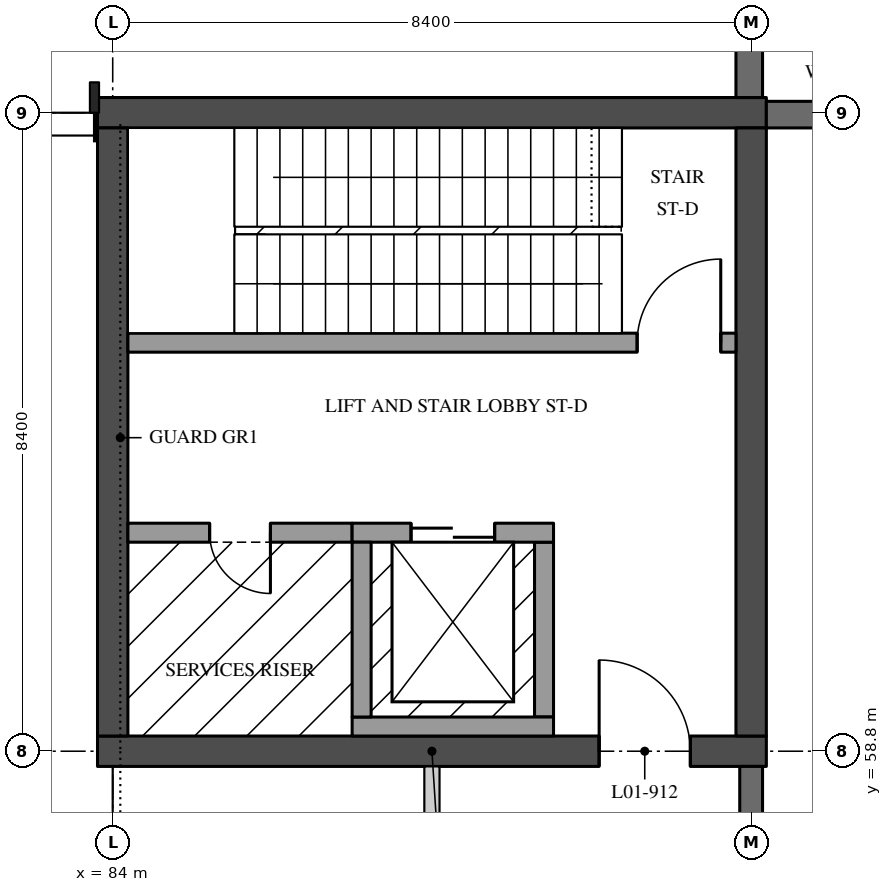
"""IFC4 building model, lengths in metres.
Left out: names, types, materials, properties, quantities, classifications, styles, units other than length and angle.
Written with IfcOpenShell. Run it as: python <this file> out.ifc"""

import sys

from ifc_helpers import new_model, si_unit, direction, frame, frame_2d, origin, place, context, subcontext, project, spatial, rectangle, extrude, element, fill, save


model = new_model("IFC4")
c1 = context("Model", 3, precision=1e-05, world=origin(), true_north=direction((0.0, 1.0)))
c2 = subcontext(c1, "Body", "Model", "MODEL_VIEW")
j1 = project(units=[si_unit("LENGTHUNIT", "METRE"), si_unit("PLANEANGLEUNIT", "RADIAN")], contexts=[c1])
p1 = place(None, origin())
s1 = spatial("IfcSite", under=j1, at=p1, CompositionType="ELEMENT")
p2 = place(p1, origin())
s2 = spatial("IfcBuilding", under=s1, at=p2, CompositionType="ELEMENT")
p3 = place(p2, frame((0.0, 0.0, 5.4)))
s3 = spatial("IfcBuildingStorey", under=s2, at=p3, CompositionType="ELEMENT", Elevation=5.4)
p4 = place(p3, frame((83.8, 58.8, 0.0), z_axis=(0.0, 0.0, 1.0), x_axis=(1.0, 0.0, 0.0)))
e1 = element("IfcWall", 1, at=p4, inside=s3, PredefinedType="SHEAR", context=c2, shape_type="SweptSolid", body=[
    extrude(rectangle(XDim=8.8, YDim=0.4, at=frame_2d((4.4, 0.0))), origin(), (0.0, 0.0, 1.0), 4.25),
])
p5 = place(p4, frame((6.6, 0.0, 0.0)))
e2 = element("IfcOpeningElement", 2, at=p5, cuts=e1, PredefinedType="OPENING", context=c2, shape_type="SweptSolid", body=[
    extrude(rectangle(XDim=1.2, YDim=2.1, at=frame_2d((0.6, 1.05))), frame((0.0, 0.21, 0.0), z_axis=(0.0, -1.0, 0.0), x_axis=(1.0, 0.0, 0.0)), (0.0, 0.0, 1.0), 0.42),
])
p6 = place(p3, frame((83.8, 67.2, 0.0), z_axis=(0.0, 0.0, 1.0), x_axis=(1.0, 0.0, 0.0)))
e3 = element("IfcWall", 3, at=p6, inside=s3, PredefinedType="SHEAR", context=c2, shape_type="SweptSolid", body=[
    extrude(rectangle(XDim=8.8, YDim=0.4, at=frame_2d((4.4, 0.0))), origin(), (0.0, 0.0, 1.0), 4.25),
])
for number, where, z_axis, x_axis in (
    (4, (84.0, 59.0, 0.0), (0.0, 0.0, 1.0), (0.0, 1.0, 0.0)),
    (5, (92.4, 59.0, 0.0), (0.0, 0.0, 1.0), (0.0, 1.0, 0.0)),
):
    element("IfcWall", number, at=place(p3, frame(where, z_axis=z_axis, x_axis=x_axis)), inside=s3, PredefinedType="SHEAR", context=c2, shape_type="SweptSolid", body=[
        extrude(rectangle(XDim=8.0, YDim=0.4, at=frame_2d((4.0, 0.0))), origin(), (0.0, 0.0, 1.0), 4.25),
    ])
p7 = place(p3, frame((92.2, 64.175, 0.0), z_axis=(0.0, 0.0, 1.0), x_axis=(-1.0, 0.0, 0.0)))
e6 = element("IfcWall", 6, at=p7, inside=s3, PredefinedType="SOLIDWALL", context=c2, shape_type="SweptSolid", body=[
    extrude(rectangle(XDim=8.0, YDim=0.25, at=frame_2d((4.0, 0.0))), origin(), (0.0, 0.0, 1.0), 4.25),
])
p8 = place(p7, frame((0.2, 0.0, 0.0)))
e7 = element("IfcOpeningElement", 7, at=p8, cuts=e6, PredefinedType="OPENING", context=c2, shape_type="SweptSolid", body=[
    extrude(rectangle(XDim=1.1, YDim=2.1, at=frame_2d((0.55, 1.05))), frame((0.0, 0.135, 0.0), z_axis=(0.0, -1.0, 0.0), x_axis=(1.0, 0.0, 0.0)), (0.0, 0.0, 1.0), 0.27),
])
p9 = place(p3, frame((87.15, 61.675, 0.0), z_axis=(0.0, 0.0, 1.0), x_axis=(-1.0, 0.0, 0.0)))
e8 = element("IfcWall", 8, at=p9, inside=s3, PredefinedType="SOLIDWALL", context=c2, shape_type="SweptSolid", body=[
    extrude(rectangle(XDim=2.95, YDim=0.25, at=frame_2d((1.475, 0.0))), origin(), (0.0, 0.0, 1.0), 4.25),
])
p10 = place(p9, frame((1.075, 0.0, 0.0)))
e9 = element("IfcOpeningElement", 9, at=p10, cuts=e8, PredefinedType="OPENING", context=c2, shape_type="SweptSolid", body=[
    extrude(rectangle(XDim=0.8, YDim=2.1, at=frame_2d((0.4, 1.05))), frame((0.0, 0.135, 0.0), z_axis=(0.0, -1.0, 0.0), x_axis=(1.0, 0.0, 0.0)), (0.0, 0.0, 1.0), 0.27),
])
p11 = place(p3, frame((89.675, 59.25, 0.0), z_axis=(0.0, 0.0, 1.0), x_axis=(0.0, 1.0, 0.0)))
e10 = element("IfcWall", 10, at=p11, inside=s3, PredefinedType="SOLIDWALL", context=c2, shape_type="SweptSolid", body=[
    extrude(rectangle(XDim=2.3, YDim=0.25, at=frame_2d((1.15, 0.0))), origin(), (0.0, 0.0, 1.0), 4.25),
])
p12 = place(p3, frame((87.15, 61.675, 0.0), z_axis=(0.0, 0.0, 1.0), x_axis=(1.0, 0.0, 0.0)))
e11 = element("IfcWall", 11, at=p12, inside=s3, PredefinedType="SOLIDWALL", context=c2, shape_type="SweptSolid", body=[
    extrude(rectangle(XDim=2.65, YDim=0.25, at=frame_2d((1.325, 0.0))), origin(), (0.0, 0.0, 1.0), 4.25),
])
p13 = place(p12, frame((0.775, 0.0, 0.0)))
e12 = element("IfcOpeningElement", 12, at=p13, cuts=e11, PredefinedType="OPENING", context=c2, shape_type="SweptSolid", body=[
    extrude(rectangle(XDim=1.1, YDim=2.1, at=frame_2d((0.55, 1.05))), frame((0.0, 0.135, 0.0), z_axis=(0.0, -1.0, 0.0), x_axis=(1.0, 0.0, 0.0)), (0.0, 0.0, 1.0), 0.27),
])
p14 = place(p3, frame((87.15, 59.125, 0.0), z_axis=(0.0, 0.0, 1.0), x_axis=(1.0, 0.0, 0.0)))
e13 = element("IfcWall", 13, at=p14, inside=s3, PredefinedType="SOLIDWALL", context=c2, shape_type="SweptSolid", body=[
    extrude(rectangle(XDim=2.65, YDim=0.25, at=frame_2d((1.325, 0.0))), origin(), (0.0, 0.0, 1.0), 4.25),
])
p15 = place(p3, frame((87.275, 59.25, 0.0), z_axis=(0.0, 0.0, 1.0), x_axis=(0.0, 1.0, 0.0)))
e14 = element("IfcWall", 14, at=p15, inside=s3, PredefinedType="SOLIDWALL", context=c2, shape_type="SweptSolid", body=[
    extrude(rectangle(XDim=2.3, YDim=0.25, at=frame_2d((1.15, 0.0))), origin(), (0.0, 0.0, 1.0), 4.25),
])
p16 = place(p2, origin())
s4 = spatial("IfcBuildingStorey", under=s2, at=p16, CompositionType="ELEMENT", Elevation=0.0)
p17 = place(p16, frame((84.0, 54.6, 0.0), z_axis=(0.0, 0.0, 1.0), x_axis=(0.0, 1.0, 0.0)))
e15 = element("IfcWall", 15, at=p17, inside=s4, PredefinedType="PARTITIONING", context=c2, shape_type="SweptSolid", body=[
    extrude(rectangle(XDim=4.0, YDim=0.2, at=frame_2d((2.0, 0.0))), origin(), (0.0, 0.0, 1.0), 18.77),
])
p18 = place(p17, frame((1.5, 0.0, 0.0)))
e16 = element("IfcOpeningElement", 16, at=p18, cuts=e15, PredefinedType="OPENING", context=c2, shape_type="SweptSolid", body=[
    extrude(rectangle(XDim=1.0, YDim=2.4, at=frame_2d((0.5, 1.2))), frame((0.0, 0.11, 0.0), z_axis=(0.0, -1.0, 0.0), x_axis=(1.0, 0.0, 0.0)), (0.0, 0.0, 1.0), 0.22),
])
p19 = place(p16, frame((79.9, 63.0, 0.0), z_axis=(0.0, 0.0, 1.0), x_axis=(1.0, 0.0, 0.0)))
e17 = element("IfcWall", 17, at=p19, inside=s4, PredefinedType="PARTITIONING", context=c2, shape_type="SweptSolid", body=[
    extrude(rectangle(XDim=3.9, YDim=0.2, at=frame_2d((1.95, 0.0))), origin(), (0.0, 0.0, 1.0), 18.77),
])
p20 = place(p19, frame((1.45, 0.0, 0.0)))
e18 = element("IfcOpeningElement", 18, at=p20, cuts=e17, PredefinedType="OPENING", context=c2, shape_type="SweptSolid", body=[
    extrude(rectangle(XDim=1.0, YDim=2.1, at=frame_2d((0.5, 1.05))), frame((0.0, 0.11, 0.0), z_axis=(0.0, -1.0, 0.0), x_axis=(1.0, 0.0, 0.0)), (0.0, 0.0, 1.0), 0.22),
])
p21 = place(p3, frame((88.2, 54.6, 0.0), z_axis=(0.0, 0.0, 1.0), x_axis=(0.0, 1.0, 0.0)))
e19 = element("IfcWall", 19, at=p21, inside=s3, PredefinedType="PARTITIONING", context=c2, shape_type="SweptSolid", body=[
    extrude(rectangle(XDim=4.0, YDim=0.2, at=frame_2d((2.0, 0.0))), origin(), (0.0, 0.0, 1.0), 4.25),
])
p22 = place(p21, frame((1.5, 0.0, 0.0)))
e20 = element("IfcOpeningElement", 20, at=p22, cuts=e19, PredefinedType="OPENING", context=c2, shape_type="SweptSolid", body=[
    extrude(rectangle(XDim=1.0, YDim=2.4, at=frame_2d((0.5, 1.2))), frame((0.0, 0.11, 0.0), z_axis=(0.0, -1.0, 0.0), x_axis=(1.0, 0.0, 0.0)), (0.0, 0.0, 1.0), 0.22),
])
p23 = place(p3, frame((92.375, 75.4, 0.0), z_axis=(0.0, 0.0, 1.0), x_axis=(0.0, -1.0, 0.0)))
e21 = element("IfcWall", 21, at=p23, inside=s3, PredefinedType="SOLIDWALL", context=c2, shape_type="SweptSolid", body=[
    extrude(rectangle(XDim=8.0, YDim=0.35, at=frame_2d((4.0, 0.0))), origin(), (0.0, 0.0, 1.0), 3.746),
])
p24 = place(p23, frame((2.8, 0.0, 1.5)))
e22 = element("IfcOpeningElement", 22, at=p24, cuts=e21, PredefinedType="OPENING", context=c2, shape_type="SweptSolid", body=[
    extrude(rectangle(XDim=0.3, YDim=1.5, at=frame_2d((0.15, 0.75))), frame((0.0, 0.185, 0.0), z_axis=(0.0, -1.0, 0.0), x_axis=(1.0, 0.0, 0.0)), (0.0, 0.0, 1.0), 0.37),
])
p25 = place(p23, frame((4.45, 0.0, 1.5)))
e23 = element("IfcOpeningElement", 23, at=p25, cuts=e21, PredefinedType="OPENING", context=c2, shape_type="SweptSolid", body=[
    extrude(rectangle(XDim=1.2, YDim=1.5, at=frame_2d((0.6, 0.75))), frame((0.0, 0.185, 0.0), z_axis=(0.0, -1.0, 0.0), x_axis=(1.0, 0.0, 0.0)), (0.0, 0.0, 1.0), 0.37),
])
p26 = place(p23, frame((7.0, 0.0, 1.5)))
e24 = element("IfcOpeningElement", 24, at=p26, cuts=e21, PredefinedType="OPENING", context=c2, shape_type="SweptSolid", body=[
    extrude(rectangle(XDim=0.3, YDim=1.5, at=frame_2d((0.15, 0.75))), frame((0.0, 0.185, 0.0), z_axis=(0.0, -1.0, 0.0), x_axis=(1.0, 0.0, 0.0)), (0.0, 0.0, 1.0), 0.37),
])
p27 = place(p3, frame((92.6, 67.175, 0.0), z_axis=(0.0, 0.0, 1.0), x_axis=(1.0, 0.0, 0.0)))
e25 = element("IfcWall", 25, at=p27, inside=s3, PredefinedType="SOLIDWALL", context=c2, shape_type="SweptSolid", body=[
    extrude(rectangle(XDim=7.77, YDim=0.35, at=frame_2d((3.885, 0.0))), origin(), (0.0, 0.0, 1.0), 3.746),
])
p28 = place(p27, frame((0.7, 0.0, 1.5)))
e26 = element("IfcOpeningElement", 26, at=p28, cuts=e25, PredefinedType="OPENING", context=c2, shape_type="SweptSolid", body=[
    extrude(rectangle(XDim=0.3, YDim=1.5, at=frame_2d((0.15, 0.75))), frame((0.0, 0.185, 0.0), z_axis=(0.0, -1.0, 0.0), x_axis=(1.0, 0.0, 0.0)), (0.0, 0.0, 1.0), 0.37),
])
p29 = place(p27, frame((2.35, 0.0, 1.5)))
e27 = element("IfcOpeningElement", 27, at=p29, cuts=e25, PredefinedType="OPENING", context=c2, shape_type="SweptSolid", body=[
    extrude(rectangle(XDim=1.2, YDim=1.5, at=frame_2d((0.6, 0.75))), frame((0.0, 0.185, 0.0), z_axis=(0.0, -1.0, 0.0), x_axis=(1.0, 0.0, 0.0)), (0.0, 0.0, 1.0), 0.37),
])
p30 = place(p27, frame((4.9, 0.0, 1.5)))
e28 = element("IfcOpeningElement", 28, at=p30, cuts=e25, PredefinedType="OPENING", context=c2, shape_type="SweptSolid", body=[
    extrude(rectangle(XDim=0.3, YDim=1.5, at=frame_2d((0.15, 0.75))), frame((0.0, 0.185, 0.0), z_axis=(0.0, -1.0, 0.0), x_axis=(1.0, 0.0, 0.0)), (0.0, 0.0, 1.0), 0.37),
])
p31 = place(p3, frame((92.4, 50.73, 0.0), z_axis=(0.0, 0.0, 1.0), x_axis=(0.0, 1.0, 0.0)))
e29 = element("IfcWall", 29, at=p31, inside=s3, PredefinedType="SOLIDWALL", context=c2, shape_type="SweptSolid", body=[
    extrude(rectangle(XDim=7.87, YDim=0.3, at=frame_2d((3.935, 0.0))), origin(), (0.0, 0.0, 1.0), 4.5),
])
p32 = place(p5, origin())
e30 = element("IfcDoor", 30, at=p32, inside=s3, OperationType="SINGLE_SWING_RIGHT", PredefinedType="DOOR", context=c2, shape_type="SweptSolid", body=[
    extrude(rectangle(XDim=1.2, YDim=2.1, at=frame_2d((0.6, 1.05))), frame((0.0, 0.035, 0.0), z_axis=(0.0, -1.0, 0.0), x_axis=(1.0, 0.0, 0.0)), (0.0, 0.0, 1.0), 0.07),
])
fill(e2, e30)
p33 = place(p10, origin())
e31 = element("IfcDoor", 31, at=p33, inside=s3, OperationType="SINGLE_SWING_RIGHT", PredefinedType="DOOR", context=c2, shape_type="SweptSolid", body=[
    extrude(rectangle(XDim=0.8, YDim=2.1, at=frame_2d((0.4, 1.05))), frame((0.0, 0.035, 0.0), z_axis=(0.0, -1.0, 0.0), x_axis=(1.0, 0.0, 0.0)), (0.0, 0.0, 1.0), 0.07),
])
fill(e9, e31)
p34 = place(p8, frame((1.1, 0.0, 0.0), z_axis=(0.0, 0.0, 1.0), x_axis=(-1.0, 0.0, 0.0)))
e32 = element("IfcDoor", 32, at=p34, inside=s3, OperationType="SINGLE_SWING_LEFT", PredefinedType="DOOR", context=c2, shape_type="SweptSolid", body=[
    extrude(rectangle(XDim=1.1, YDim=2.1, at=frame_2d((0.55, 1.05))), frame((0.0, 0.035, 0.0), z_axis=(0.0, -1.0, 0.0), x_axis=(1.0, 0.0, 0.0)), (0.0, 0.0, 1.0), 0.07),
])
fill(e7, e32)
p35 = place(p13, origin())
e33 = element("IfcDoor", 33, at=p35, inside=s3, OperationType="DOUBLE_DOOR_SLIDING", PredefinedType="DOOR", context=c2, shape_type="SweptSolid", body=[
    extrude(rectangle(XDim=1.1, YDim=2.1, at=frame_2d((0.55, 1.05))), frame((0.0, 0.04, 0.0), z_axis=(0.0, -1.0, 0.0), x_axis=(1.0, 0.0, 0.0)), (0.0, 0.0, 1.0), 0.08),
])
fill(e12, e33)
save(model, sys.argv[1])
